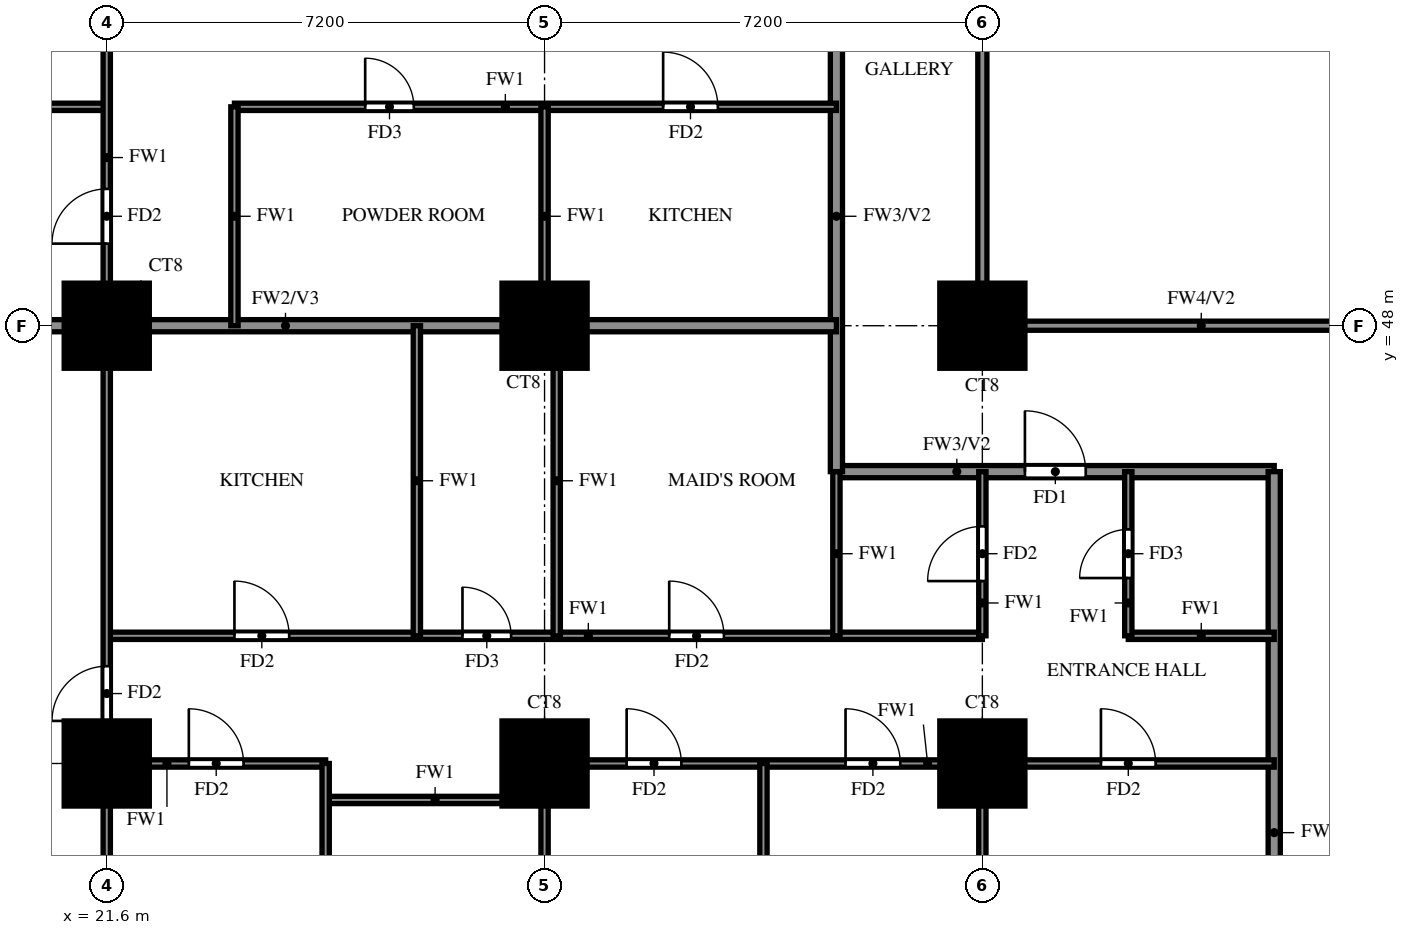
"""IFC4 building model, lengths in metres.
Left out: names, types, materials, properties, quantities, classifications, styles, units other than length and angle.
Written with IfcOpenShell. Run it as: python <this file> out.ifc"""

import sys

from ifc_helpers import new_model, si_unit, direction, frame, frame_2d, origin, origin_2d, place, context, subcontext, project, spatial, rectangle, extrude, source, transform, mapped, element, fill, save


model = new_model("IFC4")
c1 = context("Model", 3, precision=1e-05, world=origin(), true_north=direction((0.0, 1.0)))
c2 = subcontext(c1, "Body", "Model", "MODEL_VIEW")
j1 = project(units=[si_unit("LENGTHUNIT", "METRE"), si_unit("PLANEANGLEUNIT", "RADIAN")], contexts=[c1])
p1 = place(None, origin())
s1 = spatial("IfcSite", under=j1, at=p1, CompositionType="ELEMENT")
p2 = place(p1, origin())
s2 = spatial("IfcBuilding", under=s1, at=p2, CompositionType="ELEMENT")
p3 = place(p2, frame((0.0, 0.0, 44.5)))
s3 = spatial("IfcBuildingStorey", under=s2, at=p3, CompositionType="ELEMENT", Elevation=44.5)
m1 = source(origin(), c2, "Body", "SweptSolid", [
    extrude(rectangle(XDim=1.4, YDim=1.4, at=origin_2d()), origin(), (0.0, 0.0, 1.0), 3.18),
])
for number, where, z_axis, x_axis in (
    (1, (21.6, 40.8, 0.0), (0.0, 0.0, 1.0), (1.0, 0.0, 0.0)),
    (2, (28.8, 40.8, 0.0), (0.0, 0.0, 1.0), (1.0, 0.0, 0.0)),
    (3, (36.0, 40.8, 0.0), (0.0, 0.0, 1.0), (1.0, 0.0, 0.0)),
    (4, (21.6, 48.0, 0.0), (0.0, 0.0, 1.0), (1.0, 0.0, 0.0)),
    (5, (28.8, 48.0, 0.0), (0.0, 0.0, 1.0), (1.0, 0.0, 0.0)),
    (6, (36.0, 48.0, 0.0), (0.0, 0.0, 1.0), (1.0, 0.0, 0.0)),
):
    element("IfcColumn", number, at=place(p3, frame(where, z_axis=z_axis, x_axis=x_axis)), inside=s3, PredefinedType="COLUMN", context=c2, shape_type="MappedRepresentation", body=[
        mapped(m1, transform((0.0, 0.0, 0.0))),
    ])
p4 = place(p3, frame((33.6, 45.6, 0.0), z_axis=(0.0, 0.0, 1.0), x_axis=(1.0, 0.0, 0.0)))
e7 = element("IfcWall", 7, at=p4, inside=s3, PredefinedType="SOLIDWALL", context=c2, shape_type="SweptSolid", body=[
    extrude(rectangle(XDim=7.2, YDim=0.2, at=frame_2d((3.6, 0.0))), origin(), (0.0, 0.0, 1.0), 3.18),
])
p5 = place(p4, frame((3.1, 0.0, 0.0)))
e8 = element("IfcOpeningElement", 8, at=p5, cuts=e7, PredefinedType="OPENING", context=c2, shape_type="SweptSolid", body=[
    extrude(rectangle(XDim=1.0, YDim=2.1, at=frame_2d((0.5, 1.05))), frame((0.0, 0.11, 0.0), z_axis=(0.0, -1.0, 0.0), x_axis=(1.0, 0.0, 0.0)), (0.0, 0.0, 1.0), 0.22),
])
p6 = place(p3, frame((33.6, 45.6, 0.0), z_axis=(0.0, 0.0, 1.0), x_axis=(0.0, 1.0, 0.0)))
e9 = element("IfcWall", 9, at=p6, inside=s3, PredefinedType="SOLIDWALL", context=c2, shape_type="SweptSolid", body=[
    extrude(rectangle(XDim=8.4, YDim=0.2, at=frame_2d((4.2, 0.0))), origin(), (0.0, 0.0, 1.0), 3.18),
])
p7 = place(p3, frame((40.8, 33.725, 0.0), z_axis=(0.0, 0.0, 1.0), x_axis=(0.0, 1.0, 0.0)))
e10 = element("IfcWall", 10, at=p7, inside=s3, PredefinedType="SOLIDWALL", context=c2, shape_type="SweptSolid", body=[
    extrude(rectangle(XDim=11.875, YDim=0.2, at=frame_2d((5.938, 0.0))), origin(), (0.0, 0.0, 1.0), 2.28),
])
p8 = place(p3, frame((14.525, 48.0, 0.0), z_axis=(0.0, 0.0, 1.0), x_axis=(1.0, 0.0, 0.0)))
e11 = element("IfcWall", 11, at=p8, inside=s3, PredefinedType="SOLIDWALL", context=c2, shape_type="SweptSolid", body=[
    extrude(rectangle(XDim=19.075, YDim=0.2, at=frame_2d((9.538, 0.0))), origin(), (0.0, 0.0, 1.0), 3.18),
])
p9 = place(p3, frame((25.2, 40.2, 0.0), z_axis=(0.0, 0.0, 1.0), x_axis=(1.0, 0.0, 0.0)))
e12 = element("IfcWall", 12, at=p9, inside=s3, PredefinedType="PARTITIONING", context=c2, shape_type="SweptSolid", body=[
    extrude(rectangle(XDim=3.6, YDim=0.12, at=frame_2d((1.8, 0.0))), origin(), (0.0, 0.0, 1.0), 3.18),
])
p10 = place(p3, frame((21.6, 40.8, 0.0), z_axis=(0.0, 0.0, 1.0), x_axis=(1.0, 0.0, 0.0)))
e13 = element("IfcWall", 13, at=p10, inside=s3, PredefinedType="PARTITIONING", context=c2, shape_type="SweptSolid", body=[
    extrude(rectangle(XDim=3.6, YDim=0.12, at=frame_2d((1.8, 0.0))), origin(), (0.0, 0.0, 1.0), 3.18),
])
p11 = place(p10, frame((1.35, 0.0, 0.0)))
e14 = element("IfcOpeningElement", 14, at=p11, cuts=e13, PredefinedType="OPENING", context=c2, shape_type="SweptSolid", body=[
    extrude(rectangle(XDim=0.9, YDim=2.1, at=frame_2d((0.45, 1.05))), frame((0.0, 0.07, 0.0), z_axis=(0.0, -1.0, 0.0), x_axis=(1.0, 0.0, 0.0)), (0.0, 0.0, 1.0), 0.14),
])
p12 = place(p3, frame((28.8, 40.8, 0.0), z_axis=(0.0, 0.0, 1.0), x_axis=(1.0, 0.0, 0.0)))
e15 = element("IfcWall", 15, at=p12, inside=s3, PredefinedType="PARTITIONING", context=c2, shape_type="SweptSolid", body=[
    extrude(rectangle(XDim=12.0, YDim=0.12, at=frame_2d((6.0, 0.0))), origin(), (0.0, 0.0, 1.0), 3.18),
])
p13 = place(p12, frame((1.35, 0.0, 0.0)))
e16 = element("IfcOpeningElement", 16, at=p13, cuts=e15, PredefinedType="OPENING", context=c2, shape_type="SweptSolid", body=[
    extrude(rectangle(XDim=0.9, YDim=2.1, at=frame_2d((0.45, 1.05))), frame((0.0, 0.07, 0.0), z_axis=(0.0, -1.0, 0.0), x_axis=(1.0, 0.0, 0.0)), (0.0, 0.0, 1.0), 0.14),
])
p14 = place(p12, frame((4.95, 0.0, 0.0)))
e17 = element("IfcOpeningElement", 17, at=p14, cuts=e15, PredefinedType="OPENING", context=c2, shape_type="SweptSolid", body=[
    extrude(rectangle(XDim=0.9, YDim=2.1, at=frame_2d((0.45, 1.05))), frame((0.0, 0.07, 0.0), z_axis=(0.0, -1.0, 0.0), x_axis=(1.0, 0.0, 0.0)), (0.0, 0.0, 1.0), 0.14),
])
p15 = place(p12, frame((9.15, 0.0, 0.0)))
e18 = element("IfcOpeningElement", 18, at=p15, cuts=e15, PredefinedType="OPENING", context=c2, shape_type="SweptSolid", body=[
    extrude(rectangle(XDim=0.9, YDim=2.1, at=frame_2d((0.45, 1.05))), frame((0.0, 0.07, 0.0), z_axis=(0.0, -1.0, 0.0), x_axis=(1.0, 0.0, 0.0)), (0.0, 0.0, 1.0), 0.14),
])
p16 = place(p3, frame((21.6, 42.9, 0.0), z_axis=(0.0, 0.0, 1.0), x_axis=(1.0, 0.0, 0.0)))
e19 = element("IfcWall", 19, at=p16, inside=s3, PredefinedType="PARTITIONING", context=c2, shape_type="SweptSolid", body=[
    extrude(rectangle(XDim=14.4, YDim=0.12, at=frame_2d((7.2, 0.0))), origin(), (0.0, 0.0, 1.0), 3.18),
])
p17 = place(p16, frame((2.1, 0.0, 0.0)))
e20 = element("IfcOpeningElement", 20, at=p17, cuts=e19, PredefinedType="OPENING", context=c2, shape_type="SweptSolid", body=[
    extrude(rectangle(XDim=0.9, YDim=2.1, at=frame_2d((0.45, 1.05))), frame((0.0, 0.07, 0.0), z_axis=(0.0, -1.0, 0.0), x_axis=(1.0, 0.0, 0.0)), (0.0, 0.0, 1.0), 0.14),
])
p18 = place(p16, frame((5.85, 0.0, 0.0)))
e21 = element("IfcOpeningElement", 21, at=p18, cuts=e19, PredefinedType="OPENING", context=c2, shape_type="SweptSolid", body=[
    extrude(rectangle(XDim=0.8, YDim=2.1, at=frame_2d((0.4, 1.05))), frame((0.0, 0.07, 0.0), z_axis=(0.0, -1.0, 0.0), x_axis=(1.0, 0.0, 0.0)), (0.0, 0.0, 1.0), 0.14),
])
p19 = place(p16, frame((9.25, 0.0, 0.0)))
e22 = element("IfcOpeningElement", 22, at=p19, cuts=e19, PredefinedType="OPENING", context=c2, shape_type="SweptSolid", body=[
    extrude(rectangle(XDim=0.9, YDim=2.1, at=frame_2d((0.45, 1.05))), frame((0.0, 0.07, 0.0), z_axis=(0.0, -1.0, 0.0), x_axis=(1.0, 0.0, 0.0)), (0.0, 0.0, 1.0), 0.14),
])
p20 = place(p3, frame((38.4, 42.9, 0.0), z_axis=(0.0, 0.0, 1.0), x_axis=(1.0, 0.0, 0.0)))
e23 = element("IfcWall", 23, at=p20, inside=s3, PredefinedType="PARTITIONING", context=c2, shape_type="SweptSolid", body=[
    extrude(rectangle(XDim=2.4, YDim=0.12, at=frame_2d((1.2, 0.0))), origin(), (0.0, 0.0, 1.0), 3.18),
])
p21 = place(p3, frame((14.525, 51.6, 0.0), z_axis=(0.0, 0.0, 1.0), x_axis=(1.0, 0.0, 0.0)))
e24 = element("IfcWall", 24, at=p21, inside=s3, PredefinedType="PARTITIONING", context=c2, shape_type="SweptSolid", body=[
    extrude(rectangle(XDim=7.075, YDim=0.12, at=frame_2d((3.538, 0.0))), origin(), (0.0, 0.0, 1.0), 2.28),
])
p22 = place(p3, frame((23.7, 51.6, 0.0), z_axis=(0.0, 0.0, 1.0), x_axis=(1.0, 0.0, 0.0)))
e25 = element("IfcWall", 25, at=p22, inside=s3, PredefinedType="PARTITIONING", context=c2, shape_type="SweptSolid", body=[
    extrude(rectangle(XDim=9.9, YDim=0.12, at=frame_2d((4.95, 0.0))), origin(), (0.0, 0.0, 1.0), 3.18),
])
p23 = place(p22, frame((2.15, 0.0, 0.0)))
e26 = element("IfcOpeningElement", 26, at=p23, cuts=e25, PredefinedType="OPENING", context=c2, shape_type="SweptSolid", body=[
    extrude(rectangle(XDim=0.8, YDim=2.1, at=frame_2d((0.4, 1.05))), frame((0.0, 0.07, 0.0), z_axis=(0.0, -1.0, 0.0), x_axis=(1.0, 0.0, 0.0)), (0.0, 0.0, 1.0), 0.14),
])
p24 = place(p22, frame((7.05, 0.0, 0.0)))
e27 = element("IfcOpeningElement", 27, at=p24, cuts=e25, PredefinedType="OPENING", context=c2, shape_type="SweptSolid", body=[
    extrude(rectangle(XDim=0.9, YDim=2.1, at=frame_2d((0.45, 1.05))), frame((0.0, 0.07, 0.0), z_axis=(0.0, -1.0, 0.0), x_axis=(1.0, 0.0, 0.0)), (0.0, 0.0, 1.0), 0.14),
])
p25 = place(p3, frame((21.6, 33.725, 0.0), z_axis=(0.0, 0.0, 1.0), x_axis=(0.0, 1.0, 0.0)))
e28 = element("IfcWall", 28, at=p25, inside=s3, PredefinedType="PARTITIONING", context=c2, shape_type="SweptSolid", body=[
    extrude(rectangle(XDim=35.875, YDim=0.12, at=frame_2d((17.938, 0.0))), origin(), (0.0, 0.0, 1.0), 3.18),
])
p26 = place(p25, frame((7.775, 0.0, 0.0)))
e29 = element("IfcOpeningElement", 29, at=p26, cuts=e28, PredefinedType="OPENING", context=c2, shape_type="SweptSolid", body=[
    extrude(rectangle(XDim=0.9, YDim=2.1, at=frame_2d((0.45, 1.05))), frame((0.0, 0.07, 0.0), z_axis=(0.0, -1.0, 0.0), x_axis=(1.0, 0.0, 0.0)), (0.0, 0.0, 1.0), 0.14),
])
p27 = place(p25, frame((15.625, 0.0, 0.0)))
e30 = element("IfcOpeningElement", 30, at=p27, cuts=e28, PredefinedType="OPENING", context=c2, shape_type="SweptSolid", body=[
    extrude(rectangle(XDim=0.9, YDim=2.1, at=frame_2d((0.45, 1.05))), frame((0.0, 0.07, 0.0), z_axis=(0.0, -1.0, 0.0), x_axis=(1.0, 0.0, 0.0)), (0.0, 0.0, 1.0), 0.14),
])
p28 = place(p25, frame((22.225, 0.0, 0.0)))
e31 = element("IfcOpeningElement", 31, at=p28, cuts=e28, PredefinedType="OPENING", context=c2, shape_type="SweptSolid", body=[
    extrude(rectangle(XDim=1.5, YDim=2.1, at=frame_2d((0.75, 1.05))), frame((0.0, 0.07, 0.0), z_axis=(0.0, -1.0, 0.0), x_axis=(1.0, 0.0, 0.0)), (0.0, 0.0, 1.0), 0.14),
])
p29 = place(p25, frame((26.425, 0.0, 0.0)))
e32 = element("IfcOpeningElement", 32, at=p29, cuts=e28, PredefinedType="OPENING", context=c2, shape_type="SweptSolid", body=[
    extrude(rectangle(XDim=0.9, YDim=2.1, at=frame_2d((0.45, 1.05))), frame((0.0, 0.07, 0.0), z_axis=(0.0, -1.0, 0.0), x_axis=(1.0, 0.0, 0.0)), (0.0, 0.0, 1.0), 0.14),
])
p30 = place(p25, frame((31.825, 0.0, 0.0)))
e33 = element("IfcOpeningElement", 33, at=p30, cuts=e28, PredefinedType="OPENING", context=c2, shape_type="SweptSolid", body=[
    extrude(rectangle(XDim=0.9, YDim=2.1, at=frame_2d((0.45, 1.05))), frame((0.0, 0.07, 0.0), z_axis=(0.0, -1.0, 0.0), x_axis=(1.0, 0.0, 0.0)), (0.0, 0.0, 1.0), 0.14),
])
p31 = place(p3, frame((23.7, 48.0, 0.0), z_axis=(0.0, 0.0, 1.0), x_axis=(0.0, 1.0, 0.0)))
e34 = element("IfcWall", 34, at=p31, inside=s3, PredefinedType="PARTITIONING", context=c2, shape_type="SweptSolid", body=[
    extrude(rectangle(XDim=3.6, YDim=0.12, at=frame_2d((1.8, 0.0))), origin(), (0.0, 0.0, 1.0), 3.18),
])
p32 = place(p3, frame((25.2, 33.725, 0.0), z_axis=(0.0, 0.0, 1.0), x_axis=(0.0, 1.0, 0.0)))
e35 = element("IfcWall", 35, at=p32, inside=s3, PredefinedType="PARTITIONING", context=c2, shape_type="SweptSolid", body=[
    extrude(rectangle(XDim=7.075, YDim=0.12, at=frame_2d((3.538, 0.0))), origin(), (0.0, 0.0, 1.0), 2.28),
])
p33 = place(p32, frame((2.837, 0.0, 0.0)))
e36 = element("IfcOpeningElement", 36, at=p33, cuts=e35, PredefinedType="OPENING", context=c2, shape_type="SweptSolid", body=[
    extrude(rectangle(XDim=0.8, YDim=2.1, at=frame_2d((0.4, 1.05))), frame((0.0, 0.07, 0.0), z_axis=(0.0, -1.0, 0.0), x_axis=(1.0, 0.0, 0.0)), (0.0, 0.0, 1.0), 0.14),
])
p34 = place(p3, frame((26.7, 42.9, 0.0), z_axis=(0.0, 0.0, 1.0), x_axis=(0.0, 1.0, 0.0)))
e37 = element("IfcWall", 37, at=p34, inside=s3, PredefinedType="PARTITIONING", context=c2, shape_type="SweptSolid", body=[
    extrude(rectangle(XDim=5.1, YDim=0.12, at=frame_2d((2.55, 0.0))), origin(), (0.0, 0.0, 1.0), 3.18),
])
p35 = place(p3, frame((28.8, 33.725, 0.0), z_axis=(0.0, 0.0, 1.0), x_axis=(0.0, 1.0, 0.0)))
e38 = element("IfcWall", 38, at=p35, inside=s3, PredefinedType="PARTITIONING", context=c2, shape_type="SweptSolid", body=[
    extrude(rectangle(XDim=7.075, YDim=0.12, at=frame_2d((3.538, 0.0))), origin(), (0.0, 0.0, 1.0), 3.18),
])
p36 = place(p3, frame((28.8, 48.0, 0.0), z_axis=(0.0, 0.0, 1.0), x_axis=(0.0, 1.0, 0.0)))
e39 = element("IfcWall", 39, at=p36, inside=s3, PredefinedType="PARTITIONING", context=c2, shape_type="SweptSolid", body=[
    extrude(rectangle(XDim=3.6, YDim=0.12, at=frame_2d((1.8, 0.0))), origin(), (0.0, 0.0, 1.0), 3.18),
])
p37 = place(p3, frame((29.0, 42.9, 0.0), z_axis=(0.0, 0.0, 1.0), x_axis=(0.0, 1.0, 0.0)))
e40 = element("IfcWall", 40, at=p37, inside=s3, PredefinedType="PARTITIONING", context=c2, shape_type="SweptSolid", body=[
    extrude(rectangle(XDim=5.1, YDim=0.12, at=frame_2d((2.55, 0.0))), origin(), (0.0, 0.0, 1.0), 3.18),
])
p38 = place(p3, frame((32.4, 33.725, 0.0), z_axis=(0.0, 0.0, 1.0), x_axis=(0.0, 1.0, 0.0)))
e41 = element("IfcWall", 41, at=p38, inside=s3, PredefinedType="PARTITIONING", context=c2, shape_type="SweptSolid", body=[
    extrude(rectangle(XDim=7.075, YDim=0.12, at=frame_2d((3.538, 0.0))), origin(), (0.0, 0.0, 1.0), 2.28),
])
p39 = place(p3, frame((33.6, 42.9, 0.0), z_axis=(0.0, 0.0, 1.0), x_axis=(0.0, 1.0, 0.0)))
e42 = element("IfcWall", 42, at=p39, inside=s3, PredefinedType="PARTITIONING", context=c2, shape_type="SweptSolid", body=[
    extrude(rectangle(XDim=2.7, YDim=0.12, at=frame_2d((1.35, 0.0))), origin(), (0.0, 0.0, 1.0), 3.18),
])
p40 = place(p3, frame((36.0, 33.725, 0.0), z_axis=(0.0, 0.0, 1.0), x_axis=(0.0, 1.0, 0.0)))
e43 = element("IfcWall", 43, at=p40, inside=s3, PredefinedType="PARTITIONING", context=c2, shape_type="SweptSolid", body=[
    extrude(rectangle(XDim=7.075, YDim=0.12, at=frame_2d((3.538, 0.0))), origin(), (0.0, 0.0, 1.0), 3.18),
])
p41 = place(p3, frame((36.0, 42.9, 0.0), z_axis=(0.0, 0.0, 1.0), x_axis=(0.0, 1.0, 0.0)))
e44 = element("IfcWall", 44, at=p41, inside=s3, PredefinedType="PARTITIONING", context=c2, shape_type="SweptSolid", body=[
    extrude(rectangle(XDim=2.7, YDim=0.12, at=frame_2d((1.35, 0.0))), origin(), (0.0, 0.0, 1.0), 3.18),
])
p42 = place(p41, frame((0.9, 0.0, 0.0)))
e45 = element("IfcOpeningElement", 45, at=p42, cuts=e44, PredefinedType="OPENING", context=c2, shape_type="SweptSolid", body=[
    extrude(rectangle(XDim=0.9, YDim=2.1, at=frame_2d((0.45, 1.05))), frame((0.0, 0.07, 0.0), z_axis=(0.0, -1.0, 0.0), x_axis=(1.0, 0.0, 0.0)), (0.0, 0.0, 1.0), 0.14),
])
p43 = place(p3, frame((38.4, 42.9, 0.0), z_axis=(0.0, 0.0, 1.0), x_axis=(0.0, 1.0, 0.0)))
e46 = element("IfcWall", 46, at=p43, inside=s3, PredefinedType="PARTITIONING", context=c2, shape_type="SweptSolid", body=[
    extrude(rectangle(XDim=2.7, YDim=0.12, at=frame_2d((1.35, 0.0))), origin(), (0.0, 0.0, 1.0), 3.18),
])
p44 = place(p43, frame((0.95, 0.0, 0.0)))
e47 = element("IfcOpeningElement", 47, at=p44, cuts=e46, PredefinedType="OPENING", context=c2, shape_type="SweptSolid", body=[
    extrude(rectangle(XDim=0.8, YDim=2.1, at=frame_2d((0.4, 1.05))), frame((0.0, 0.07, 0.0), z_axis=(0.0, -1.0, 0.0), x_axis=(1.0, 0.0, 0.0)), (0.0, 0.0, 1.0), 0.14),
])
p45 = place(p3, frame((36.0, 48.0, 0.0), z_axis=(0.0, 0.0, 1.0), x_axis=(1.0, 0.0, 0.0)))
e48 = element("IfcWall", 48, at=p45, inside=s3, PredefinedType="SOLIDWALL", context=c2, shape_type="SweptSolid", body=[
    extrude(rectangle(XDim=7.2, YDim=0.15, at=frame_2d((3.6, 0.0))), origin(), (0.0, 0.0, 1.0), 2.28),
])
p46 = place(p3, frame((36.0, 48.0, 0.0), z_axis=(0.0, 0.0, 1.0), x_axis=(0.0, 1.0, 0.0)))
e49 = element("IfcWall", 49, at=p46, inside=s3, PredefinedType="SOLIDWALL", context=c2, shape_type="SweptSolid", body=[
    extrude(rectangle(XDim=14.4, YDim=0.15, at=frame_2d((7.2, 0.0))), origin(), (0.0, 0.0, 1.0), 2.28),
])
p47 = place(p5, origin())
e50 = element("IfcDoor", 50, at=p47, inside=s3, OperationType="SINGLE_SWING_LEFT", PredefinedType="DOOR", context=c2, shape_type="SweptSolid", body=[
    extrude(rectangle(XDim=1.0, YDim=2.1, at=frame_2d((0.5, 1.05))), frame((0.0, 0.025, 0.0), z_axis=(0.0, -1.0, 0.0), x_axis=(1.0, 0.0, 0.0)), (0.0, 0.0, 1.0), 0.05),
])
fill(e8, e50)
p48 = place(p26, origin())
e51 = element("IfcDoor", 51, at=p48, inside=s3, OperationType="SINGLE_SWING_RIGHT", PredefinedType="DOOR", context=c2, shape_type="SweptSolid", body=[
    extrude(rectangle(XDim=0.9, YDim=2.1, at=frame_2d((0.45, 1.05))), frame((0.0, 0.025, 0.0), z_axis=(0.0, -1.0, 0.0), x_axis=(1.0, 0.0, 0.0)), (0.0, 0.0, 1.0), 0.05),
])
fill(e29, e51)
p49 = place(p11, origin())
e52 = element("IfcDoor", 52, at=p49, inside=s3, OperationType="SINGLE_SWING_RIGHT", PredefinedType="DOOR", context=c2, shape_type="SweptSolid", body=[
    extrude(rectangle(XDim=0.9, YDim=2.1, at=frame_2d((0.45, 1.05))), frame((0.0, 0.025, 0.0), z_axis=(0.0, -1.0, 0.0), x_axis=(1.0, 0.0, 0.0)), (0.0, 0.0, 1.0), 0.05),
])
fill(e14, e52)
p50 = place(p13, origin())
e53 = element("IfcDoor", 53, at=p50, inside=s3, OperationType="SINGLE_SWING_LEFT", PredefinedType="DOOR", context=c2, shape_type="SweptSolid", body=[
    extrude(rectangle(XDim=0.9, YDim=2.1, at=frame_2d((0.45, 1.05))), frame((0.0, 0.025, 0.0), z_axis=(0.0, -1.0, 0.0), x_axis=(1.0, 0.0, 0.0)), (0.0, 0.0, 1.0), 0.05),
])
fill(e16, e53)
p51 = place(p14, origin())
e54 = element("IfcDoor", 54, at=p51, inside=s3, OperationType="SINGLE_SWING_RIGHT", PredefinedType="DOOR", context=c2, shape_type="SweptSolid", body=[
    extrude(rectangle(XDim=0.9, YDim=2.1, at=frame_2d((0.45, 1.05))), frame((0.0, 0.025, 0.0), z_axis=(0.0, -1.0, 0.0), x_axis=(1.0, 0.0, 0.0)), (0.0, 0.0, 1.0), 0.05),
])
fill(e17, e54)
p52 = place(p15, origin())
e55 = element("IfcDoor", 55, at=p52, inside=s3, OperationType="SINGLE_SWING_LEFT", PredefinedType="DOOR", context=c2, shape_type="SweptSolid", body=[
    extrude(rectangle(XDim=0.9, YDim=2.1, at=frame_2d((0.45, 1.05))), frame((0.0, 0.025, 0.0), z_axis=(0.0, -1.0, 0.0), x_axis=(1.0, 0.0, 0.0)), (0.0, 0.0, 1.0), 0.05),
])
fill(e18, e55)
p53 = place(p17, origin())
e56 = element("IfcDoor", 56, at=p53, inside=s3, OperationType="SINGLE_SWING_LEFT", PredefinedType="DOOR", context=c2, shape_type="SweptSolid", body=[
    extrude(rectangle(XDim=0.9, YDim=2.1, at=frame_2d((0.45, 1.05))), frame((0.0, 0.025, 0.0), z_axis=(0.0, -1.0, 0.0), x_axis=(1.0, 0.0, 0.0)), (0.0, 0.0, 1.0), 0.05),
])
fill(e20, e56)
p54 = place(p18, origin())
e57 = element("IfcDoor", 57, at=p54, inside=s3, OperationType="SINGLE_SWING_RIGHT", PredefinedType="DOOR", context=c2, shape_type="SweptSolid", body=[
    extrude(rectangle(XDim=0.8, YDim=2.1, at=frame_2d((0.4, 1.05))), frame((0.0, 0.025, 0.0), z_axis=(0.0, -1.0, 0.0), x_axis=(1.0, 0.0, 0.0)), (0.0, 0.0, 1.0), 0.05),
])
fill(e21, e57)
p55 = place(p19, origin())
e58 = element("IfcDoor", 58, at=p55, inside=s3, OperationType="SINGLE_SWING_LEFT", PredefinedType="DOOR", context=c2, shape_type="SweptSolid", body=[
    extrude(rectangle(XDim=0.9, YDim=2.1, at=frame_2d((0.45, 1.05))), frame((0.0, 0.025, 0.0), z_axis=(0.0, -1.0, 0.0), x_axis=(1.0, 0.0, 0.0)), (0.0, 0.0, 1.0), 0.05),
])
fill(e22, e58)
p56 = place(p42, origin())
e59 = element("IfcDoor", 59, at=p56, inside=s3, OperationType="SINGLE_SWING_LEFT", PredefinedType="DOOR", context=c2, shape_type="SweptSolid", body=[
    extrude(rectangle(XDim=0.9, YDim=2.1, at=frame_2d((0.45, 1.05))), frame((0.0, 0.025, 0.0), z_axis=(0.0, -1.0, 0.0), x_axis=(1.0, 0.0, 0.0)), (0.0, 0.0, 1.0), 0.05),
])
fill(e45, e59)
p57 = place(p44, origin())
e60 = element("IfcDoor", 60, at=p57, inside=s3, OperationType="SINGLE_SWING_RIGHT", PredefinedType="DOOR", context=c2, shape_type="SweptSolid", body=[
    extrude(rectangle(XDim=0.8, YDim=2.1, at=frame_2d((0.4, 1.05))), frame((0.0, 0.025, 0.0), z_axis=(0.0, -1.0, 0.0), x_axis=(1.0, 0.0, 0.0)), (0.0, 0.0, 1.0), 0.05),
])
fill(e47, e60)
p58 = place(p27, origin())
e61 = element("IfcDoor", 61, at=p58, inside=s3, OperationType="SINGLE_SWING_LEFT", PredefinedType="DOOR", context=c2, shape_type="SweptSolid", body=[
    extrude(rectangle(XDim=0.9, YDim=2.1, at=frame_2d((0.45, 1.05))), frame((0.0, 0.025, 0.0), z_axis=(0.0, -1.0, 0.0), x_axis=(1.0, 0.0, 0.0)), (0.0, 0.0, 1.0), 0.05),
])
fill(e30, e61)
p59 = place(p23, origin())
e62 = element("IfcDoor", 62, at=p59, inside=s3, OperationType="SINGLE_SWING_LEFT", PredefinedType="DOOR", context=c2, shape_type="SweptSolid", body=[
    extrude(rectangle(XDim=0.8, YDim=2.1, at=frame_2d((0.4, 1.05))), frame((0.0, 0.025, 0.0), z_axis=(0.0, -1.0, 0.0), x_axis=(1.0, 0.0, 0.0)), (0.0, 0.0, 1.0), 0.05),
])
fill(e26, e62)
p60 = place(p24, origin())
e63 = element("IfcDoor", 63, at=p60, inside=s3, OperationType="SINGLE_SWING_RIGHT", PredefinedType="DOOR", context=c2, shape_type="SweptSolid", body=[
    extrude(rectangle(XDim=0.9, YDim=2.1, at=frame_2d((0.45, 1.05))), frame((0.0, 0.025, 0.0), z_axis=(0.0, -1.0, 0.0), x_axis=(1.0, 0.0, 0.0)), (0.0, 0.0, 1.0), 0.05),
])
fill(e27, e63)
save(model, sys.argv[1])
